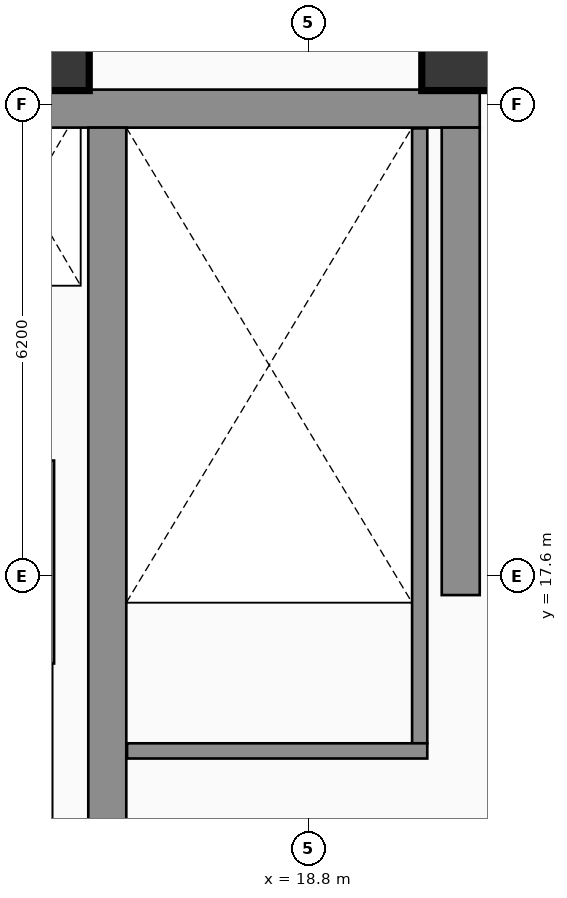
"""IFC4 building model, lengths in metres.
Left out: names, types, materials, properties, quantities, classifications, styles, units other than length and angle.
Written with IfcOpenShell. Run it as: python <this file> out.ifc"""

import sys

from ifc_helpers import new_model, si_unit, direction, frame, frame_2d, origin, origin_2d, place, context, subcontext, project, spatial, rectangle, extrude, element, fill, save


model = new_model("IFC4")
c1 = context("Model", 3, precision=1e-05, world=origin(), true_north=direction((0.0, 1.0)))
c2 = subcontext(c1, "Body", "Model", "MODEL_VIEW")
j1 = project(units=[si_unit("LENGTHUNIT", "METRE"), si_unit("PLANEANGLEUNIT", "RADIAN")], contexts=[c1])
p1 = place(None, origin())
s1 = spatial("IfcSite", under=j1, at=p1, CompositionType="ELEMENT")
p2 = place(p1, origin())
s2 = spatial("IfcBuilding", under=s1, at=p2, CompositionType="ELEMENT")
p3 = place(p2, frame((0.0, 0.0, 344.2)))
s3 = spatial("IfcBuildingStorey", under=s2, at=p3, CompositionType="ELEMENT", Elevation=344.2)
p4 = place(p3, frame((7.2, 23.75, 0.0), z_axis=(0.0, 0.0, 1.0), x_axis=(1.0, 0.0, 0.0)))
e1 = element("IfcWall", 1, at=p4, inside=s3, PredefinedType="SHEAR", context=c2, shape_type="SweptSolid", body=[
    extrude(rectangle(XDim=13.85, YDim=0.5, at=frame_2d((6.925, 0.0))), origin(), (0.0, 0.0, 1.0), 3.66),
])
p5 = place(p3, frame((20.8, 17.35, 0.0), z_axis=(0.0, 0.0, 1.0), x_axis=(0.0, 1.0, 0.0)))
e2 = element("IfcWall", 2, at=p5, inside=s3, PredefinedType="SHEAR", context=c2, shape_type="SweptSolid", body=[
    extrude(rectangle(XDim=6.15, YDim=0.5, at=frame_2d((3.075, 0.0))), origin(), (0.0, 0.0, 1.0), 3.66),
])
p6 = place(p3, frame((16.15, 14.4, 0.0), z_axis=(0.0, 0.0, 1.0), x_axis=(0.0, 1.0, 0.0)))
e3 = element("IfcWall", 3, at=p6, inside=s3, PredefinedType="SHEAR", context=c2, shape_type="SweptSolid", body=[
    extrude(rectangle(XDim=9.1, YDim=0.5, at=frame_2d((4.55, 0.0))), origin(), (0.0, 0.0, 1.0), 3.66),
])
for number, where, z_axis, x_axis in (
    (4, (15.45, 24.45, 0.0), (0.0, 0.0, 1.0), (1.0, 0.0, 0.0)),
    (5, (20.75, 24.45, 0.0), (0.0, 0.0, 1.0), (1.0, 0.0, 0.0)),
):
    element("IfcColumn", number, at=place(p3, frame(where, z_axis=z_axis, x_axis=x_axis)), inside=s3, PredefinedType="COLUMN", context=c2, shape_type="SweptSolid", body=[
        extrude(rectangle(XDim=0.9, YDim=0.9, at=origin_2d()), origin(), (0.0, 0.0, 1.0), 3.66),
    ])
p7 = place(p3, frame((27.685, 19.175, 0.0), z_axis=(0.0, 0.0, 1.0), x_axis=(-0.707106781187, 0.707106781187, 0.0)))
e6 = element("IfcWall", 6, at=p7, inside=s3, PredefinedType="SOLIDWALL", context=c2, shape_type="SweptSolid", body=[
    extrude(rectangle(XDim=9.207, YDim=0.28, at=frame_2d((4.603, 0.0))), origin(), (0.0, 0.0, 1.0), 3.66),
])
p8 = place(p3, frame((20.26, 15.4, 0.0), z_axis=(0.0, 0.0, 1.0), x_axis=(0.0, 1.0, 0.0)))
e7 = element("IfcWall", 7, at=p8, inside=s3, PredefinedType="SHEAR", context=c2, shape_type="SweptSolid", body=[
    extrude(rectangle(XDim=8.09, YDim=0.2, at=frame_2d((4.045, 0.0))), origin(), (0.0, 0.0, 1.0), 3.66),
])
p9 = place(p3, frame((16.41, 15.3, 0.0), z_axis=(0.0, 0.0, 1.0), x_axis=(1.0, 0.0, 0.0)))
e8 = element("IfcWall", 8, at=p9, inside=s3, PredefinedType="PARTITIONING", context=c2, shape_type="SweptSolid", body=[
    extrude(rectangle(XDim=3.95, YDim=0.2, at=frame_2d((1.975, 0.0))), origin(), (0.0, 0.0, 1.0), 3.66),
])
p10 = place(p9, frame((1.294, 0.0, 0.0)))
e9 = element("IfcOpeningElement", 9, at=p10, cuts=e8, PredefinedType="OPENING", context=c2, shape_type="SweptSolid", body=[
    extrude(rectangle(XDim=1.1, YDim=2.2, at=frame_2d((0.55, 1.1))), frame((0.0, 0.11, 0.0), z_axis=(0.0, -1.0, 0.0), x_axis=(1.0, 0.0, 0.0)), (0.0, 0.0, 1.0), 0.22),
])
p11 = place(p3, frame((15.35, 14.22, 0.0), z_axis=(0.0, 0.0, 1.0), x_axis=(0.0, 1.0, 0.0)))
e10 = element("IfcWall", 10, at=p11, inside=s3, PredefinedType="PARTITIONING", context=c2, shape_type="SweptSolid", body=[
    extrude(rectangle(XDim=2.23, YDim=0.15, at=frame_2d((1.115, 0.0))), origin(), (0.0, 0.0, 1.0), 3.66),
])
p12 = place(p3, frame((15.35, 16.45, 0.0), z_axis=(0.0, 0.0, 1.0), x_axis=(0.0, 1.0, 0.0)))
e11 = element("IfcWall", 11, at=p12, inside=s3, PredefinedType="PARTITIONING", context=c2, shape_type="SweptSolid", body=[
    extrude(rectangle(XDim=2.67, YDim=0.2, at=frame_2d((1.335, 0.0))), origin(), (0.0, 0.0, 1.0), 3.66),
])
p13 = place(p10, origin())
e12 = element("IfcDoor", 12, at=p13, inside=s3, OperationType="SINGLE_SWING_RIGHT", PredefinedType="DOOR", context=c2, shape_type="SweptSolid", body=[
    extrude(rectangle(XDim=1.1, YDim=2.2, at=frame_2d((0.55, 1.1))), frame((0.0, 0.025, 0.0), z_axis=(0.0, -1.0, 0.0), x_axis=(1.0, 0.0, 0.0)), (0.0, 0.0, 1.0), 0.05),
])
fill(e9, e12)
save(model, sys.argv[1])
